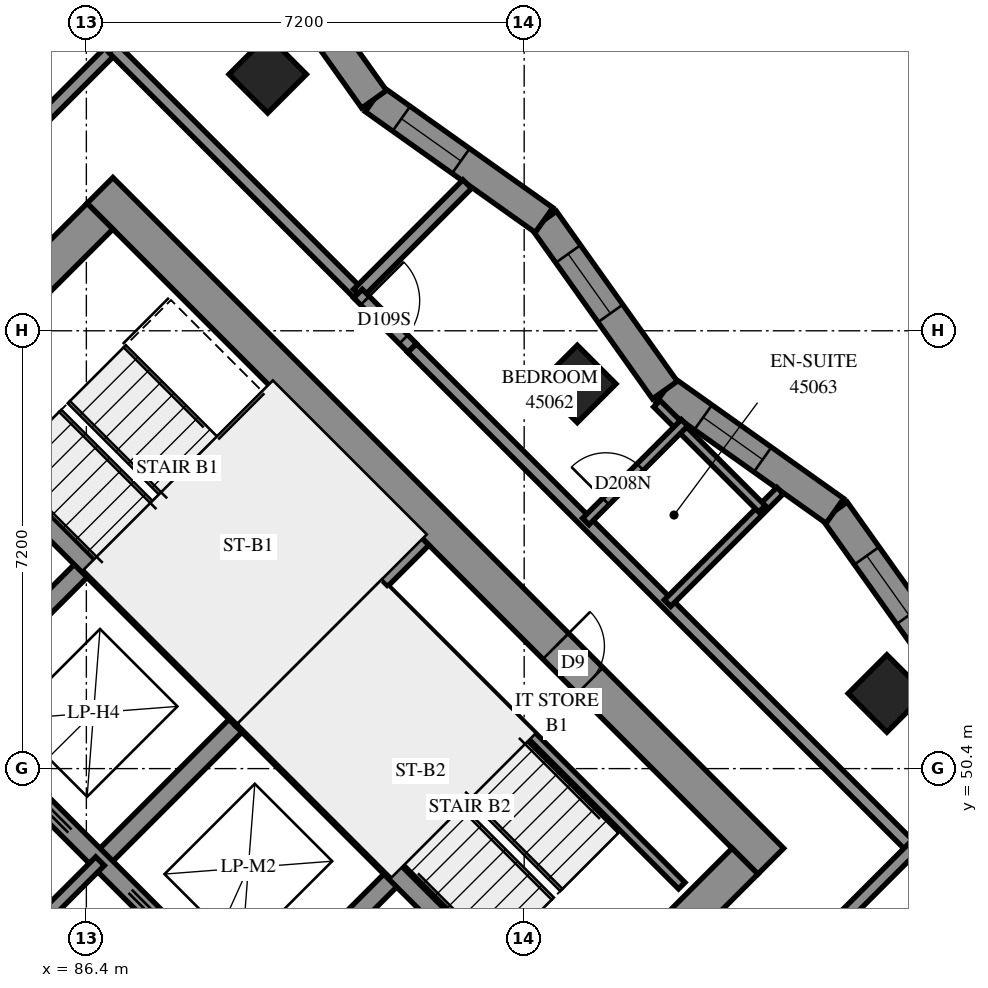
"""IFC4 building model, lengths in metres.
Left out: names, types, materials, properties, quantities, classifications, styles, units other than length and angle.
Written with IfcOpenShell. Run it as: python <this file> out.ifc"""

import sys

from ifc_helpers import new_model, si_unit, direction, frame, frame_2d, origin, origin_2d, place, context, subcontext, project, spatial, polyline, rectangle, outline, extrude, element, fill, save


model = new_model("IFC4")
c1 = context("Model", 3, precision=1e-05, world=origin(), true_north=direction((0.0, 1.0)))
c2 = subcontext(c1, "Body", "Model", "MODEL_VIEW")
j1 = project(units=[si_unit("LENGTHUNIT", "METRE"), si_unit("PLANEANGLEUNIT", "RADIAN")], contexts=[c1])
p1 = place(None, origin())
s1 = spatial("IfcSite", under=j1, at=p1, CompositionType="ELEMENT")
p2 = place(p1, origin())
s2 = spatial("IfcBuilding", under=s1, at=p2, CompositionType="ELEMENT")
p3 = place(p2, frame((0.0, 0.0, 166.0)))
s3 = spatial("IfcBuildingStorey", under=s2, at=p3, CompositionType="ELEMENT", Elevation=166.0)
for number, where, z_axis, x_axis in (
    (1, (89.382, 61.818, 0.0), (0.0, 0.0, 1.0), (0.707, -0.707, 0.0)),
    (2, (94.474, 56.727, 0.0), (0.0, 0.0, 1.0), (0.707, -0.707, 0.0)),
    (3, (99.565, 51.635, 0.0), (0.0, 0.0, 1.0), (0.707, -0.707, 0.0)),
):
    element("IfcColumn", number, at=place(p3, frame(where, z_axis=z_axis, x_axis=x_axis)), inside=s3, PredefinedType="COLUMN", context=c2, shape_type="SweptSolid", body=[
        extrude(rectangle(XDim=0.9, YDim=0.9, at=origin_2d()), origin(), (0.0, 0.0, 1.0), 3.1),
    ])
p4 = place(p3, frame((76.018, 49.302, -0.3), z_axis=(0.0, 0.0, 1.0), x_axis=(0.7071067812, -0.7071067812, 0.0)))
e4 = element("IfcWall", 4, at=p4, inside=s3, PredefinedType="SHEAR", context=c2, shape_type="SweptSolid", body=[
    extrude(rectangle(XDim=15.6, YDim=0.6, at=frame_2d((7.8, 0.0))), origin(), (0.0, 0.0, 1.0), 2.7),
])
p5 = place(p3, frame((86.625, 59.908, -0.3), z_axis=(0.0, 0.0, 1.0), x_axis=(0.7071067812, -0.7071067812, 0.0)))
e5 = element("IfcWall", 5, at=p5, inside=s3, PredefinedType="SHEAR", context=c2, shape_type="SweptSolid", body=[
    extrude(rectangle(XDim=15.6, YDim=0.6, at=frame_2d((7.8, 0.0))), origin(), (0.0, 0.0, 1.0), 2.7),
])
p6 = place(p5, frame((10.6, 0.0, 0.3)))
e6 = element("IfcOpeningElement", 6, at=p6, cuts=e5, PredefinedType="OPENING", context=c2, shape_type="SweptSolid", body=[
    extrude(rectangle(XDim=0.8, YDim=2.1, at=frame_2d((0.4, 1.05))), frame((0.0, 0.31, 0.0), z_axis=(0.0, -1.0, 0.0), x_axis=(1.0, 0.0, 0.0)), (0.0, 0.0, 1.0), 0.62),
])
p7 = place(p3, frame((76.442, 49.302, -0.3), z_axis=(0.0, 0.0, 1.0), x_axis=(0.7071067812, 0.7071067812, 0.0)))
e7 = element("IfcWall", 7, at=p7, inside=s3, PredefinedType="SHEAR", context=c2, shape_type="SweptSolid", body=[
    extrude(rectangle(XDim=14.4, YDim=0.6, at=frame_2d((7.2, 0.0))), origin(), (0.0, 0.0, 1.0), 2.7),
])
p8 = place(p7, frame((4.55, 0.0, 0.3)))
e8 = element("IfcOpeningElement", 8, at=p8, cuts=e7, PredefinedType="OPENING", context=c2, shape_type="SweptSolid", body=[
    extrude(rectangle(XDim=1.1, YDim=2.1, at=frame_2d((0.55, 1.05))), frame((0.0, 0.31, 0.0), z_axis=(0.0, -1.0, 0.0), x_axis=(1.0, 0.0, 0.0)), (0.0, 0.0, 1.0), 0.62),
])
p9 = place(p7, frame((11.35, 0.0, 0.3)))
e9 = element("IfcOpeningElement", 9, at=p9, cuts=e7, PredefinedType="OPENING", context=c2, shape_type="SweptSolid", body=[
    extrude(rectangle(XDim=1.1, YDim=2.1, at=frame_2d((0.55, 1.05))), frame((0.0, 0.31, 0.0), z_axis=(0.0, -1.0, 0.0), x_axis=(1.0, 0.0, 0.0)), (0.0, 0.0, 1.0), 0.62),
])
p10 = place(p3, frame((87.049, 38.695, -0.3), z_axis=(0.0, 0.0, 1.0), x_axis=(0.7071067812, 0.7071067812, 0.0)))
e10 = element("IfcWall", 10, at=p10, inside=s3, PredefinedType="SHEAR", context=c2, shape_type="SweptSolid", body=[
    extrude(rectangle(XDim=14.4, YDim=0.6, at=frame_2d((7.2, 0.0))), origin(), (0.0, 0.0, 1.0), 2.7),
])
p11 = place(p10, frame((4.55, 0.0, 0.3)))
e11 = element("IfcOpeningElement", 11, at=p11, cuts=e10, PredefinedType="OPENING", context=c2, shape_type="SweptSolid", body=[
    extrude(rectangle(XDim=1.1, YDim=2.1, at=frame_2d((0.55, 1.05))), frame((0.0, 0.31, 0.0), z_axis=(0.0, -1.0, 0.0), x_axis=(1.0, 0.0, 0.0)), (0.0, 0.0, 1.0), 0.62),
])
p12 = place(p10, frame((11.35, 0.0, 0.3)))
e12 = element("IfcOpeningElement", 12, at=p12, cuts=e10, PredefinedType="OPENING", context=c2, shape_type="SweptSolid", body=[
    extrude(rectangle(XDim=1.1, YDim=2.1, at=frame_2d((0.55, 1.05))), frame((0.0, 0.31, 0.0), z_axis=(0.0, -1.0, 0.0), x_axis=(1.0, 0.0, 0.0)), (0.0, 0.0, 1.0), 0.62),
])
p13 = place(p3, frame((84.079, 51.423, 0.0), z_axis=(0.0, 0.0, 1.0), x_axis=(0.7071219326, 0.7070916295, 0.0)))
e13 = element("IfcWall", 13, at=p13, inside=s3, PredefinedType="SOLIDWALL", context=c2, shape_type="SweptSolid", body=[
    extrude(rectangle(XDim=3.3, YDim=0.3, at=frame_2d((1.65, 0.0))), origin(), (0.0, 0.0, 1.0), 3.1),
])
for number, where, z_axis, x_axis in (
    (14, (86.625, 48.878, 0.0), (0.0, 0.0, 1.0), (0.707, 0.707, 0.0)),
    (15, (89.17, 46.332, 0.0), (0.0, 0.0, 1.0), (0.707, 0.707, 0.0)),
):
    element("IfcWall", number, at=place(p3, frame(where, z_axis=z_axis, x_axis=x_axis)), inside=s3, PredefinedType="SOLIDWALL", context=c2, shape_type="SweptSolid", body=[
        extrude(rectangle(XDim=3.3, YDim=0.3, at=frame_2d((1.65, 0.0))), origin(), (0.0, 0.0, 1.0), 3.1),
    ])
p14 = place(p3, frame((78.988, 51.423, 0.0), z_axis=(0.0, 0.0, 1.0), x_axis=(0.7071067812, -0.7071067812, 0.0)))
e16 = element("IfcWall", 16, at=p14, inside=s3, PredefinedType="SOLIDWALL", context=c2, shape_type="SweptSolid", body=[
    extrude(rectangle(XDim=14.4, YDim=0.3, at=frame_2d((7.2, 0.0))), origin(), (0.0, 0.0, 1.0), 3.1),
])
p15 = place(p14, frame((1.35, 0.0, 0.0)))
e17 = element("IfcOpeningElement", 17, at=p15, cuts=e16, PredefinedType="OPENING", context=c2, shape_type="SweptSolid", body=[
    extrude(rectangle(XDim=0.9, YDim=2.1, at=frame_2d((0.45, 1.05))), frame((0.0, 0.16, 0.0), z_axis=(0.0, -1.0, 0.0), x_axis=(1.0, 0.0, 0.0)), (0.0, 0.0, 1.0), 0.32),
])
p16 = place(p14, frame((4.95, 0.0, 0.0)))
e18 = element("IfcOpeningElement", 18, at=p16, cuts=e16, PredefinedType="OPENING", context=c2, shape_type="SweptSolid", body=[
    extrude(rectangle(XDim=0.9, YDim=2.1, at=frame_2d((0.45, 1.05))), frame((0.0, 0.16, 0.0), z_axis=(0.0, -1.0, 0.0), x_axis=(1.0, 0.0, 0.0)), (0.0, 0.0, 1.0), 0.32),
])
p17 = place(p14, frame((8.55, 0.0, 0.0)))
e19 = element("IfcOpeningElement", 19, at=p17, cuts=e16, PredefinedType="OPENING", context=c2, shape_type="SweptSolid", body=[
    extrude(rectangle(XDim=0.9, YDim=2.1, at=frame_2d((0.45, 1.05))), frame((0.0, 0.16, 0.0), z_axis=(0.0, -1.0, 0.0), x_axis=(1.0, 0.0, 0.0)), (0.0, 0.0, 1.0), 0.32),
])
p18 = place(p14, frame((12.05, 0.0, 0.0)))
e20 = element("IfcOpeningElement", 20, at=p18, cuts=e16, PredefinedType="OPENING", context=c2, shape_type="SweptSolid", body=[
    extrude(rectangle(XDim=1.1, YDim=2.1, at=frame_2d((0.55, 1.05))), frame((0.0, 0.16, 0.0), z_axis=(0.0, -1.0, 0.0), x_axis=(1.0, 0.0, 0.0)), (0.0, 0.0, 1.0), 0.32),
])
p19 = place(p3, frame((81.534, 53.969, 0.0), z_axis=(0.0, 0.0, 1.0), x_axis=(0.707103309, -0.7071102534, 0.0)))
e21 = element("IfcWall", 21, at=p19, inside=s3, PredefinedType="SOLIDWALL", context=c2, shape_type="SweptSolid", body=[
    extrude(rectangle(XDim=14.4, YDim=0.3, at=frame_2d((7.2, 0.0))), origin(), (0.0, 0.0, 1.0), 3.1),
])
p20 = place(p19, frame((1.25, 0.0, 0.0)))
e22 = element("IfcOpeningElement", 22, at=p20, cuts=e21, PredefinedType="OPENING", context=c2, shape_type="SweptSolid", body=[
    extrude(rectangle(XDim=1.1, YDim=2.1, at=frame_2d((0.55, 1.05))), frame((0.0, 0.16, 0.0), z_axis=(0.0, -1.0, 0.0), x_axis=(1.0, 0.0, 0.0)), (0.0, 0.0, 1.0), 0.32),
])
p21 = place(p19, frame((4.85, 0.0, 0.0)))
e23 = element("IfcOpeningElement", 23, at=p21, cuts=e21, PredefinedType="OPENING", context=c2, shape_type="SweptSolid", body=[
    extrude(rectangle(XDim=1.1, YDim=2.1, at=frame_2d((0.55, 1.05))), frame((0.0, 0.16, 0.0), z_axis=(0.0, -1.0, 0.0), x_axis=(1.0, 0.0, 0.0)), (0.0, 0.0, 1.0), 0.32),
])
p22 = place(p19, frame((8.45, 0.0, 0.0)))
e24 = element("IfcOpeningElement", 24, at=p22, cuts=e21, PredefinedType="OPENING", context=c2, shape_type="SweptSolid", body=[
    extrude(rectangle(XDim=1.1, YDim=2.1, at=frame_2d((0.55, 1.05))), frame((0.0, 0.16, 0.0), z_axis=(0.0, -1.0, 0.0), x_axis=(1.0, 0.0, 0.0)), (0.0, 0.0, 1.0), 0.32),
])
p23 = place(p19, frame((12.05, 0.0, 0.0)))
e25 = element("IfcOpeningElement", 25, at=p23, cuts=e21, PredefinedType="OPENING", context=c2, shape_type="SweptSolid", body=[
    extrude(rectangle(XDim=1.1, YDim=2.1, at=frame_2d((0.55, 1.05))), frame((0.0, 0.16, 0.0), z_axis=(0.0, -1.0, 0.0), x_axis=(1.0, 0.0, 0.0)), (0.0, 0.0, 1.0), 0.32),
])
for number, where, z_axis, x_axis in (
    (26, (83.867, 56.302, 0.0), (0.0, 0.0, 1.0), (0.707, -0.707, 0.0)),
    (27, (88.958, 51.211, 0.0), (0.0, 0.0, 1.0), (0.707, -0.707, 0.0)),
):
    element("IfcWall", number, at=place(p3, frame(where, z_axis=z_axis, x_axis=x_axis)), inside=s3, PredefinedType="SOLIDWALL", context=c2, shape_type="SweptSolid", body=[
        extrude(rectangle(XDim=7.2, YDim=0.3, at=frame_2d((3.6, 0.0))), origin(), (0.0, 0.0, 1.0), 3.1),
    ])
p24 = place(p3, frame((88.958, 51.211, 0.0), z_axis=(0.0, 0.0, 1.0), x_axis=(0.7071067812, 0.7071067812, 0.0)))
e28 = element("IfcWall", 28, at=p24, inside=s3, PredefinedType="SOLIDWALL", context=c2, shape_type="SweptSolid", body=[
    extrude(rectangle(XDim=4.2, YDim=0.3, at=frame_2d((2.1, 0.0))), origin(), (0.0, 0.0, 1.0), 3.1),
])
p25 = place(p3, frame((100.697, 51.842, 0.0), z_axis=(0.0, 0.0, 1.0), x_axis=(-0.5792728992, 0.8151336751, 0.0)))
e29 = element("IfcWall", 29, at=p25, inside=s3, PredefinedType="SOLIDWALL", context=c2, shape_type="SweptSolid", body=[
    extrude(outline(polyline([(0.042, -0.25), (3.472, -0.25), (3.388, 0.25), (-0.042, 0.25), (0.042, -0.25)])), origin(), (0.0, 0.0, 1.0), 3.1),
])
p26 = place(p25, frame((1.326, 0.0, 0.45)))
e30 = element("IfcOpeningElement", 30, at=p26, cuts=e29, PredefinedType="OPENING", context=c2, shape_type="SweptSolid", body=[
    extrude(rectangle(XDim=1.2, YDim=2.5, at=frame_2d((0.6, 1.25))), frame((0.0, 0.26, 0.0), z_axis=(0.0, -1.0, 0.0), x_axis=(1.0, 0.0, 0.0)), (0.0, 0.0, 1.0), 0.52),
])
p27 = place(p3, frame((98.71, 54.638, 0.0), z_axis=(0.0, 0.0, 1.0), x_axis=(-0.8151376585, 0.5792672938, 0.0)))
e31 = element("IfcWall", 31, at=p27, inside=s3, PredefinedType="SOLIDWALL", context=c2, shape_type="SweptSolid", body=[
    extrude(outline(polyline([(-0.042, -0.25), (3.388, -0.25), (3.472, 0.25), (0.042, 0.25), (-0.042, -0.25)])), origin(), (0.0, 0.0, 1.0), 3.1),
])
p28 = place(p27, frame((1.457, 0.0, 0.45)))
e32 = element("IfcOpeningElement", 32, at=p28, cuts=e31, PredefinedType="OPENING", context=c2, shape_type="SweptSolid", body=[
    extrude(rectangle(XDim=1.2, YDim=2.5, at=frame_2d((0.6, 1.25))), frame((0.0, 0.26, 0.0), z_axis=(0.0, -1.0, 0.0), x_axis=(1.0, 0.0, 0.0)), (0.0, 0.0, 1.0), 0.52),
])
p29 = place(p3, frame((95.914, 56.624, 0.0), z_axis=(0.0, 0.0, 1.0), x_axis=(-0.5792728992, 0.8151336751, 0.0)))
e33 = element("IfcWall", 33, at=p29, inside=s3, PredefinedType="SOLIDWALL", context=c2, shape_type="SweptSolid", body=[
    extrude(outline(polyline([(0.042, -0.25), (3.472, -0.25), (3.388, 0.25), (-0.042, 0.25), (0.042, -0.25)])), origin(), (0.0, 0.0, 1.0), 3.1),
])
p30 = place(p29, frame((1.547, 0.0, 0.45)))
e34 = element("IfcOpeningElement", 34, at=p30, cuts=e33, PredefinedType="OPENING", context=c2, shape_type="SweptSolid", body=[
    extrude(rectangle(XDim=1.2, YDim=2.5, at=frame_2d((0.6, 1.25))), frame((0.0, 0.26, 0.0), z_axis=(0.0, -1.0, 0.0), x_axis=(1.0, 0.0, 0.0)), (0.0, 0.0, 1.0), 0.52),
])
p31 = place(p3, frame((93.927, 59.42, 0.0), z_axis=(0.0, 0.0, 1.0), x_axis=(-0.8151376585, 0.5792672938, 0.0)))
e35 = element("IfcWall", 35, at=p31, inside=s3, PredefinedType="SOLIDWALL", context=c2, shape_type="SweptSolid", body=[
    extrude(outline(polyline([(-0.042, -0.25), (3.388, -0.25), (3.472, 0.25), (0.042, 0.25), (-0.042, -0.25)])), origin(), (0.0, 0.0, 1.0), 3.1),
])
p32 = place(p31, frame((1.679, 0.0, 0.45)))
e36 = element("IfcOpeningElement", 36, at=p32, cuts=e35, PredefinedType="OPENING", context=c2, shape_type="SweptSolid", body=[
    extrude(rectangle(XDim=1.2, YDim=2.5, at=frame_2d((0.6, 1.25))), frame((0.0, 0.26, 0.0), z_axis=(0.0, -1.0, 0.0), x_axis=(1.0, 0.0, 0.0)), (0.0, 0.0, 1.0), 0.52),
])
p33 = place(p3, frame((91.131, 61.407, 0.0), z_axis=(0.0, 0.0, 1.0), x_axis=(-0.5792728992, 0.8151336751, 0.0)))
e37 = element("IfcWall", 37, at=p33, inside=s3, PredefinedType="SOLIDWALL", context=c2, shape_type="SweptSolid", body=[
    extrude(outline(polyline([(0.042, -0.25), (3.472, -0.25), (3.388, 0.25), (-0.042, 0.25), (0.042, -0.25)])), origin(), (0.0, 0.0, 1.0), 3.1),
])
p34 = place(p33, frame((1.768, 0.0, 0.45)))
e38 = element("IfcOpeningElement", 38, at=p34, cuts=e37, PredefinedType="OPENING", context=c2, shape_type="SweptSolid", body=[
    extrude(rectangle(XDim=1.2, YDim=2.5, at=frame_2d((0.6, 1.25))), frame((0.0, 0.26, 0.0), z_axis=(0.0, -1.0, 0.0), x_axis=(1.0, 0.0, 0.0)), (0.0, 0.0, 1.0), 0.52),
])
p35 = place(p3, frame((91.313, 53.354, 0.0), z_axis=(0.0, 0.0, 1.0), x_axis=(0.7071140275, -0.7070995348, 0.0)))
e39 = element("IfcWall", 39, at=p35, inside=s3, PredefinedType="PARTITIONING", context=c2, shape_type="SweptSolid", body=[
    extrude(rectangle(XDim=6.9, YDim=0.15, at=frame_2d((3.45, 0.0))), origin(), (0.0, 0.0, 1.0), 3.1),
])
p36 = place(p3, frame((84.079, 46.332, 0.0), z_axis=(0.0, 0.0, 1.0), x_axis=(0.7071067812, 0.7071067812, 0.0)))
e40 = element("IfcWall", 40, at=p36, inside=s3, PredefinedType="PARTITIONING", context=c2, shape_type="SweptSolid", body=[
    extrude(rectangle(XDim=3.6, YDim=0.2, at=frame_2d((1.8, 0.0))), origin(), (0.0, 0.0, 1.0), 3.1),
])
p37 = place(p3, frame((94.366, 41.348, 0.0), z_axis=(0.0, 0.0, 1.0), x_axis=(0.7071108994, 0.707102663, 0.0)))
e41 = element("IfcWall", 41, at=p37, inside=s3, PredefinedType="PARTITIONING", context=c2, shape_type="SweptSolid", body=[
    extrude(rectangle(XDim=12.141, YDim=0.2, at=frame_2d((6.071, 0.0))), origin(), (0.0, 0.0, 1.0), 3.1),
])
p38 = place(p3, frame((91.755, 57.317, 0.0), z_axis=(0.0, 0.0, 1.0), x_axis=(0.7071067812, -0.7071067812, 0.0)))
e42 = element("IfcWall", 42, at=p38, inside=s3, PredefinedType="PARTITIONING", context=c2, shape_type="SweptSolid", body=[
    extrude(rectangle(XDim=11.639, YDim=0.2, at=frame_2d((5.819, 0.0))), origin(), (0.0, 0.0, 1.0), 3.1),
])
p39 = place(p3, frame((80.154, 55.56, 0.0), z_axis=(0.0, 0.0, 1.0), x_axis=(0.7071067812, 0.7071067812, 0.0)))
e43 = element("IfcWall", 43, at=p39, inside=s3, PredefinedType="PARTITIONING", context=c2, shape_type="SweptSolid", body=[
    extrude(rectangle(XDim=9.45, YDim=0.2, at=frame_2d((4.725, 0.0))), origin(), (0.0, 0.0, 1.0), 3.1),
])
p40 = place(p39, frame((0.292, 0.0, 0.0)))
e44 = element("IfcOpeningElement", 44, at=p40, cuts=e43, PredefinedType="OPENING", context=c2, shape_type="SweptSolid", body=[
    extrude(rectangle(XDim=1.0, YDim=2.1, at=frame_2d((0.5, 1.05))), frame((0.0, 0.11, 0.0), z_axis=(0.0, -1.0, 0.0), x_axis=(1.0, 0.0, 0.0)), (0.0, 0.0, 1.0), 0.22),
])
p41 = place(p3, frame((93.306, 42.408, 0.0), z_axis=(0.0, 0.0, 1.0), x_axis=(0.7071067812, 0.7071067812, 0.0)))
e45 = element("IfcWall", 45, at=p41, inside=s3, PredefinedType="PARTITIONING", context=c2, shape_type="SweptSolid", body=[
    extrude(rectangle(XDim=9.45, YDim=0.2, at=frame_2d((4.725, 0.0))), origin(), (0.0, 0.0, 1.0), 3.1),
])
p42 = place(p41, frame((0.253, 0.0, 0.0)))
e46 = element("IfcOpeningElement", 46, at=p42, cuts=e45, PredefinedType="OPENING", context=c2, shape_type="SweptSolid", body=[
    extrude(rectangle(XDim=1.0, YDim=2.1, at=frame_2d((0.5, 1.05))), frame((0.0, 0.11, 0.0), z_axis=(0.0, -1.0, 0.0), x_axis=(1.0, 0.0, 0.0)), (0.0, 0.0, 1.0), 0.22),
])
p43 = place(p3, frame((86.841, 62.245, 0.0), z_axis=(0.0, 0.0, 1.0), x_axis=(0.7071067812, -0.7071067812, 0.0)))
e47 = element("IfcWall", 47, at=p43, inside=s3, PredefinedType="PARTITIONING", context=c2, shape_type="SweptSolid", body=[
    extrude(rectangle(XDim=5.699, YDim=0.2, at=frame_2d((2.85, 0.0))), origin(), (0.0, 0.0, 1.0), 3.1),
])
p44 = place(p3, frame((95.957, 53.121, 0.0), z_axis=(0.0, 0.0, 1.0), x_axis=(0.7070876797, 0.7071258821, 0.0)))
e48 = element("IfcWall", 48, at=p44, inside=s3, PredefinedType="PARTITIONING", context=c2, shape_type="SweptSolid", body=[
    extrude(rectangle(XDim=2.618, YDim=0.15, at=frame_2d((1.309, 0.0))), origin(), (0.0, 0.0, 1.0), 3.1),
])
p45 = place(p3, frame((90.867, 58.213, 0.0), z_axis=(0.0, 0.0, 1.0), x_axis=(0.7066148947, 0.7075983258, 0.0)))
e49 = element("IfcWall", 49, at=p45, inside=s3, PredefinedType="PARTITIONING", context=c2, shape_type="SweptSolid", body=[
    extrude(rectangle(XDim=2.542, YDim=0.2, at=frame_2d((1.271, 0.0))), origin(), (0.0, 0.0, 1.0), 3.1),
])
p46 = place(p3, frame((95.782, 56.401, 0.0), z_axis=(0.0, 0.0, 1.0), x_axis=(0.707127237, -0.7070863248, 0.0)))
e50 = element("IfcWall", 50, at=p46, inside=s3, PredefinedType="PARTITIONING", context=c2, shape_type="SweptSolid", body=[
    extrude(rectangle(XDim=2.444, YDim=0.15, at=frame_2d((1.222, 0.0))), origin(), (0.0, 0.0, 1.0), 3.1),
])
p47 = place(p3, frame((94.614, 54.464, 0.0), z_axis=(0.0, 0.0, 1.0), x_axis=(0.7071067812, 0.7071067812, 0.0)))
e51 = element("IfcWall", 51, at=p47, inside=s3, PredefinedType="PARTITIONING", context=c2, shape_type="SweptSolid", body=[
    extrude(rectangle(XDim=2.296, YDim=0.15, at=frame_2d((1.148, 0.0))), origin(), (0.0, 0.0, 1.0), 3.1),
])
p48 = place(p47, frame((0.466, 0.0, 0.0)))
e52 = element("IfcOpeningElement", 52, at=p48, cuts=e51, PredefinedType="OPENING", context=c2, shape_type="SweptSolid", body=[
    extrude(rectangle(XDim=0.8, YDim=2.1, at=frame_2d((0.4, 1.05))), frame((0.0, 0.085, 0.0), z_axis=(0.0, -1.0, 0.0), x_axis=(1.0, 0.0, 0.0)), (0.0, 0.0, 1.0), 0.17),
])
p49 = place(p3, frame((90.867, 58.211, 0.0), z_axis=(0.0, 0.0, 1.0), x_axis=(0.706312726, -0.7078999456, 0.0)))
e53 = element("IfcWall", 53, at=p49, inside=s3, PredefinedType="PARTITIONING", context=c2, shape_type="SweptSolid", body=[
    extrude(rectangle(XDim=1.26, YDim=0.2, at=frame_2d((0.63, 0.0))), origin(), (0.0, 0.0, 1.0), 3.1),
])
p50 = place(p49, frame((0.162, 0.0, 0.0)))
e54 = element("IfcOpeningElement", 54, at=p50, cuts=e53, PredefinedType="OPENING", context=c2, shape_type="SweptSolid", body=[
    extrude(rectangle(XDim=0.9, YDim=2.1, at=frame_2d((0.45, 1.05))), frame((0.0, 0.11, 0.0), z_axis=(0.0, -1.0, 0.0), x_axis=(1.0, 0.0, 0.0)), (0.0, 0.0, 1.0), 0.22),
])
p51 = place(p26, origin())
e55 = element("IfcWindow", 55, at=p51, inside=s3, PartitioningType="SINGLE_PANEL", PredefinedType="WINDOW", context=c2, shape_type="SweptSolid", body=[
    extrude(rectangle(XDim=1.2, YDim=2.5, at=frame_2d((0.6, 1.25))), frame((0.0, 0.18, 0.0), z_axis=(0.0, -1.0, 0.0), x_axis=(1.0, 0.0, 0.0)), (0.0, 0.0, 1.0), 0.06),
])
fill(e30, e55)
p52 = place(p28, origin())
e56 = element("IfcWindow", 56, at=p52, inside=s3, PartitioningType="SINGLE_PANEL", PredefinedType="WINDOW", context=c2, shape_type="SweptSolid", body=[
    extrude(rectangle(XDim=1.2, YDim=2.5, at=frame_2d((0.6, 1.25))), frame((0.0, 0.18, 0.0), z_axis=(0.0, -1.0, 0.0), x_axis=(1.0, 0.0, 0.0)), (0.0, 0.0, 1.0), 0.06),
])
fill(e32, e56)
p53 = place(p30, origin())
e57 = element("IfcWindow", 57, at=p53, inside=s3, PartitioningType="SINGLE_PANEL", PredefinedType="WINDOW", context=c2, shape_type="SweptSolid", body=[
    extrude(rectangle(XDim=1.2, YDim=2.5, at=frame_2d((0.6, 1.25))), frame((0.0, 0.18, 0.0), z_axis=(0.0, -1.0, 0.0), x_axis=(1.0, 0.0, 0.0)), (0.0, 0.0, 1.0), 0.06),
])
fill(e34, e57)
p54 = place(p32, origin())
e58 = element("IfcWindow", 58, at=p54, inside=s3, PartitioningType="SINGLE_PANEL", PredefinedType="WINDOW", context=c2, shape_type="SweptSolid", body=[
    extrude(rectangle(XDim=1.2, YDim=2.5, at=frame_2d((0.6, 1.25))), frame((0.0, 0.18, 0.0), z_axis=(0.0, -1.0, 0.0), x_axis=(1.0, 0.0, 0.0)), (0.0, 0.0, 1.0), 0.06),
])
fill(e36, e58)
p55 = place(p6, origin())
e59 = element("IfcDoor", 59, at=p55, inside=s3, OperationType="SINGLE_SWING_RIGHT", PredefinedType="DOOR", context=c2, shape_type="SweptSolid", body=[
    extrude(rectangle(XDim=0.8, YDim=2.1, at=frame_2d((0.4, 1.05))), frame((0.0, 0.025, 0.0), z_axis=(0.0, -1.0, 0.0), x_axis=(1.0, 0.0, 0.0)), (0.0, 0.0, 1.0), 0.05),
])
fill(e6, e59)
p56 = place(p50, origin())
e60 = element("IfcDoor", 60, at=p56, inside=s3, OperationType="SINGLE_SWING_RIGHT", PredefinedType="DOOR", context=c2, shape_type="SweptSolid", body=[
    extrude(rectangle(XDim=0.9, YDim=2.1, at=frame_2d((0.45, 1.05))), frame((0.0, 0.025, 0.0), z_axis=(0.0, -1.0, 0.0), x_axis=(1.0, 0.0, 0.0)), (0.0, 0.0, 1.0), 0.05),
])
fill(e54, e60)
p57 = place(p48, origin())
e61 = element("IfcDoor", 61, at=p57, inside=s3, OperationType="SINGLE_SWING_RIGHT", PredefinedType="DOOR", context=c2, shape_type="SweptSolid", body=[
    extrude(rectangle(XDim=0.8, YDim=2.1, at=frame_2d((0.4, 1.05))), frame((0.0, 0.025, 0.0), z_axis=(0.0, -1.0, 0.0), x_axis=(1.0, 0.0, 0.0)), (0.0, 0.0, 1.0), 0.05),
])
fill(e52, e61)
save(model, sys.argv[1])
